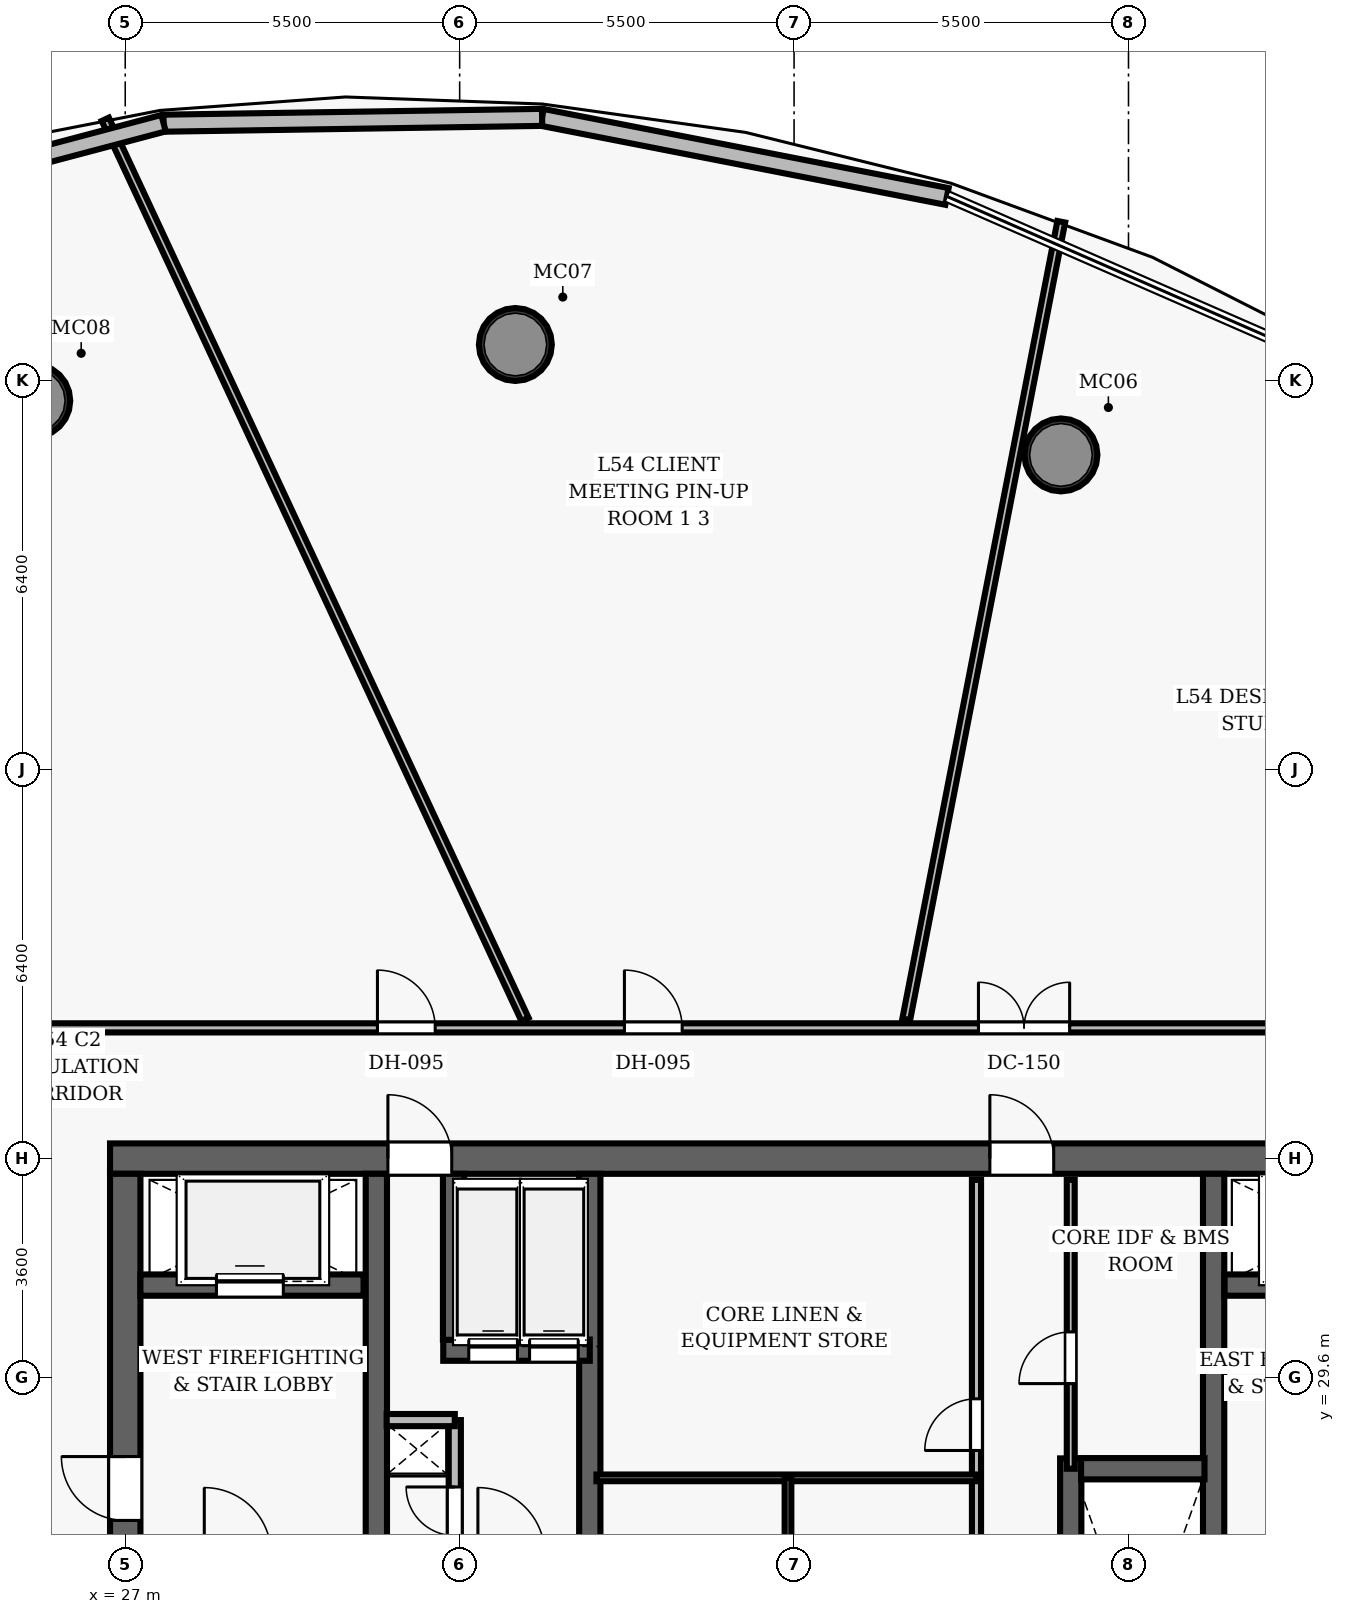
"""IFC4 building model, lengths in metres.
Left out: names, types, materials, properties, quantities, classifications, styles, units other than length and angle.
Written with IfcOpenShell. Run it as: python <this file> out.ifc"""

import sys

from ifc_helpers import new_model, si_unit, direction, frame, frame_2d, origin, origin_2d, place, context, subcontext, project, spatial, rectangle, hollow_circle, extrude, element, fill, save


model = new_model("IFC4")
c1 = context("Model", 3, precision=1e-05, world=origin(), true_north=direction((0.0, 1.0)))
c2 = subcontext(c1, "Body", "Model", "MODEL_VIEW")
j1 = project(units=[si_unit("LENGTHUNIT", "METRE"), si_unit("PLANEANGLEUNIT", "RADIAN")], contexts=[c1])
p1 = place(None, origin())
s1 = spatial("IfcSite", under=j1, at=p1, CompositionType="ELEMENT")
p2 = place(p1, origin())
s2 = spatial("IfcBuilding", under=s1, at=p2, CompositionType="ELEMENT")
p3 = place(p2, frame((0.0, 0.0, 213.55)))
s3 = spatial("IfcBuildingStorey", under=s2, at=p3, CompositionType="ELEMENT", Elevation=213.55)
p4 = place(p3, frame((26.75, 33.2, 0.0), z_axis=(0.0, 0.0, 1.0), x_axis=(1.0, 0.0, 0.0)))
e1 = element("IfcWall", 1, at=p4, inside=s3, PredefinedType="SHEAR", context=c2, shape_type="SweptSolid", body=[
    extrude(rectangle(XDim=22.5, YDim=0.5, at=frame_2d((11.25, 0.0))), origin(), (0.0, 0.0, 1.0), 3.85),
])
p5 = place(p4, frame((4.57, 0.0, 0.0)))
e2 = element("IfcOpeningElement", 2, at=p5, cuts=e1, PredefinedType="OPENING", context=c2, shape_type="SweptSolid", body=[
    extrude(rectangle(XDim=1.05, YDim=2.15, at=frame_2d((0.525, 1.075))), frame((0.0, 0.26, 0.0), z_axis=(0.0, -1.0, 0.0), x_axis=(1.0, 0.0, 0.0)), (0.0, 0.0, 1.0), 0.52),
])
p6 = place(p4, frame((14.47, 0.0, 0.0)))
e3 = element("IfcOpeningElement", 3, at=p6, cuts=e1, PredefinedType="OPENING", context=c2, shape_type="SweptSolid", body=[
    extrude(rectangle(XDim=1.05, YDim=2.15, at=frame_2d((0.525, 1.075))), frame((0.0, 0.26, 0.0), z_axis=(0.0, -1.0, 0.0), x_axis=(1.0, 0.0, 0.0)), (0.0, 0.0, 1.0), 0.52),
])
p7 = place(p3, frame((27.0, 19.05, 0.0), z_axis=(0.0, 0.0, 1.0), x_axis=(0.0, 1.0, 0.0)))
e4 = element("IfcWall", 4, at=p7, inside=s3, PredefinedType="SHEAR", context=c2, shape_type="SweptSolid", body=[
    extrude(rectangle(XDim=13.9, YDim=0.5, at=frame_2d((6.95, 0.0))), origin(), (0.0, 0.0, 1.0), 3.85),
])
p8 = place(p7, frame((8.2, 0.0, 0.0)))
e5 = element("IfcOpeningElement", 5, at=p8, cuts=e4, PredefinedType="OPENING", context=c2, shape_type="SweptSolid", body=[
    extrude(rectangle(XDim=1.05, YDim=2.15, at=frame_2d((0.525, 1.075))), frame((0.0, 0.26, 0.0), z_axis=(0.0, -1.0, 0.0), x_axis=(1.0, 0.0, 0.0)), (0.0, 0.0, 1.0), 0.52),
])
for number, where, z_axis, x_axis in (
    (6, (31.13, 19.05, 0.0), (0.0, 0.0, 1.0), (0.0, 1.0, 0.0)),
    (7, (44.9, 19.05, 0.0), (0.0, 0.0, 1.0), (0.0, 1.0, 0.0)),
):
    element("IfcWall", number, at=place(p3, frame(where, z_axis=z_axis, x_axis=x_axis)), inside=s3, PredefinedType="SHEAR", context=c2, shape_type="SweptSolid", body=[
        extrude(rectangle(XDim=13.9, YDim=0.35, at=frame_2d((6.95, 0.0))), origin(), (0.0, 0.0, 1.0), 3.85),
    ])
for number, where, z_axis, x_axis in (
    (8, (42.389, 44.772, 0.0), (0.0, 0.0, 1.0), (1.0, 0.0, 0.0)),
    (9, (33.416, 46.588, 0.0), (0.0, 0.0, 1.0), (1.0, 0.0, 0.0)),
    (10, (25.496, 45.664, 0.0), (0.0, 0.0, 1.0), (1.0, 0.0, 0.0)),
):
    element("IfcColumn", number, at=place(p3, frame(where, z_axis=z_axis, x_axis=x_axis)), inside=s3, PredefinedType="COLUMN", context=c2, shape_type="SweptSolid", body=[
        extrude(hollow_circle(Radius=0.6, WallThickness=0.05, at=origin_2d()), origin(), (0.0, 0.0, 1.0), 3.85),
    ])
p9 = place(p3, frame((27.25, 31.12, 0.0), z_axis=(0.0, 0.0, 1.0), x_axis=(1.0, 0.0, 0.0)))
e11 = element("IfcWall", 11, at=p9, inside=s3, PredefinedType="SHEAR", context=c2, shape_type="SweptSolid", body=[
    extrude(rectangle(XDim=3.67, YDim=0.35, at=frame_2d((1.835, 0.0))), origin(), (0.0, 0.0, 1.0), 3.035),
])
p10 = place(p9, frame((1.25, 0.0, 0.0)))
e12 = element("IfcOpeningElement", 12, at=p10, cuts=e11, PredefinedType="OPENING", context=c2, shape_type="SweptSolid", body=[
    extrude(rectangle(XDim=1.1, YDim=2.15, at=frame_2d((0.55, 1.075))), frame((0.0, 0.185, 0.0), z_axis=(0.0, -1.0, 0.0), x_axis=(1.0, 0.0, 0.0)), (0.0, 0.0, 1.0), 0.37),
])
p11 = place(p3, frame((45.08, 31.12, 0.0), z_axis=(0.0, 0.0, 1.0), x_axis=(1.0, 0.0, 0.0)))
e13 = element("IfcWall", 13, at=p11, inside=s3, PredefinedType="SHEAR", context=c2, shape_type="SweptSolid", body=[
    extrude(rectangle(XDim=3.67, YDim=0.35, at=frame_2d((1.835, 0.0))), origin(), (0.0, 0.0, 1.0), 3.035),
])
p12 = place(p11, frame((1.25, 0.0, 0.0)))
e14 = element("IfcOpeningElement", 14, at=p12, cuts=e13, PredefinedType="OPENING", context=c2, shape_type="SweptSolid", body=[
    extrude(rectangle(XDim=1.1, YDim=2.15, at=frame_2d((0.55, 1.075))), frame((0.0, 0.185, 0.0), z_axis=(0.0, -1.0, 0.0), x_axis=(1.0, 0.0, 0.0)), (0.0, 0.0, 1.0), 0.37),
])
p13 = place(p3, frame((34.64, 26.69, 0.0), z_axis=(0.0, 0.0, 1.0), x_axis=(0.0, 1.0, 0.0)))
e15 = element("IfcWall", 15, at=p13, inside=s3, PredefinedType="SHEAR", context=c2, shape_type="SweptSolid", body=[
    extrude(rectangle(XDim=6.26, YDim=0.35, at=frame_2d((3.13, 0.0))), origin(), (0.0, 0.0, 1.0), 3.85),
])
p14 = place(p3, frame((32.23, 30.05, 0.0), z_axis=(0.0, 0.0, 1.0), x_axis=(1.0, 0.0, 0.0)))
e16 = element("IfcWall", 16, at=p14, inside=s3, PredefinedType="SHEAR", context=c2, shape_type="SweptSolid", body=[
    extrude(rectangle(XDim=2.41, YDim=0.35, at=frame_2d((1.205, 0.0))), origin(), (0.0, 0.0, 1.0), 3.035),
])
p15 = place(p14, frame((0.42, 0.0, 0.0)))
e17 = element("IfcOpeningElement", 17, at=p15, cuts=e16, PredefinedType="OPENING", context=c2, shape_type="SweptSolid", body=[
    extrude(rectangle(XDim=0.8, YDim=2.15, at=frame_2d((0.4, 1.075))), frame((0.0, 0.185, 0.0), z_axis=(0.0, -1.0, 0.0), x_axis=(1.0, 0.0, 0.0)), (0.0, 0.0, 1.0), 0.37),
])
p16 = place(p14, frame((1.42, 0.0, 0.0)))
e18 = element("IfcOpeningElement", 18, at=p16, cuts=e16, PredefinedType="OPENING", context=c2, shape_type="SweptSolid", body=[
    extrude(rectangle(XDim=0.8, YDim=2.15, at=frame_2d((0.4, 1.075))), frame((0.0, 0.185, 0.0), z_axis=(0.0, -1.0, 0.0), x_axis=(1.0, 0.0, 0.0)), (0.0, 0.0, 1.0), 0.37),
])
p17 = place(p3, frame((32.4, 30.22, 0.0), z_axis=(0.0, 0.0, 1.0), x_axis=(0.0, 1.0, 0.0)))
e19 = element("IfcWall", 19, at=p17, inside=s3, PredefinedType="SHEAR", context=c2, shape_type="SweptSolid", body=[
    extrude(rectangle(XDim=2.73, YDim=0.35, at=frame_2d((1.365, 0.0))), origin(), (0.0, 0.0, 1.0), 3.035),
])
p18 = place(p3, frame((32.42, 26.86, 0.0), z_axis=(0.0, 0.0, 1.0), x_axis=(0.0, 1.0, 0.0)))
e20 = element("IfcWall", 20, at=p18, inside=s3, PredefinedType="PARTITIONING", context=c2, shape_type="SweptSolid", body=[
    extrude(rectangle(XDim=2.04, YDim=0.2, at=frame_2d((1.02, 0.0))), origin(), (0.0, 0.0, 1.0), 3.035),
])
p19 = place(p18, frame((0.14, 0.0, 0.0)))
e21 = element("IfcOpeningElement", 21, at=p19, cuts=e20, PredefinedType="OPENING", context=c2, shape_type="SweptSolid", body=[
    extrude(rectangle(XDim=0.8, YDim=2.05, at=frame_2d((0.4, 1.025))), frame((0.0, 0.11, 0.0), z_axis=(0.0, -1.0, 0.0), x_axis=(1.0, 0.0, 0.0)), (0.0, 0.0, 1.0), 0.22),
])
p20 = place(p3, frame((31.3, 28.9, 0.0), z_axis=(0.0, 0.0, 1.0), x_axis=(1.0, 0.0, 0.0)))
e22 = element("IfcWall", 22, at=p20, inside=s3, PredefinedType="PARTITIONING", context=c2, shape_type="SweptSolid", body=[
    extrude(rectangle(XDim=1.12, YDim=0.2, at=frame_2d((0.56, 0.0))), origin(), (0.0, 0.0, 1.0), 3.035),
])
p21 = place(p3, frame((42.55, 21.73, 0.0), z_axis=(0.0, 0.0, 1.0), x_axis=(0.0, 1.0, 0.0)))
e23 = element("IfcWall", 23, at=p21, inside=s3, PredefinedType="SHEAR", context=c2, shape_type="SweptSolid", body=[
    extrude(rectangle(XDim=6.54, YDim=0.35, at=frame_2d((3.27, 0.0))), origin(), (0.0, 0.0, 1.0), 3.035),
])
p22 = place(p3, frame((42.72, 28.1, 0.0), z_axis=(0.0, 0.0, 1.0), x_axis=(1.0, 0.0, 0.0)))
e24 = element("IfcWall", 24, at=p22, inside=s3, PredefinedType="SHEAR", context=c2, shape_type="SweptSolid", body=[
    extrude(rectangle(XDim=2.03, YDim=0.35, at=frame_2d((1.015, 0.0))), origin(), (0.0, 0.0, 1.0), 3.035),
])
p23 = place(p3, frame((41.0, 23.05, 0.0), z_axis=(0.0, 0.0, 1.0), x_axis=(0.0, 1.0, 0.0)))
e25 = element("IfcWall", 25, at=p23, inside=s3, PredefinedType="PARTITIONING", context=c2, shape_type="SweptSolid", body=[
    extrude(rectangle(XDim=9.8, YDim=0.15, at=frame_2d((4.9, 0.0))), origin(), (0.0, 0.0, 1.0), 3.035),
])
p24 = place(p23, frame((5.35, 0.0, 0.0)))
e26 = element("IfcOpeningElement", 26, at=p24, cuts=e25, PredefinedType="OPENING", context=c2, shape_type="SweptSolid", body=[
    extrude(rectangle(XDim=0.85, YDim=2.1, at=frame_2d((0.425, 1.05))), frame((0.0, 0.085, 0.0), z_axis=(0.0, -1.0, 0.0), x_axis=(1.0, 0.0, 0.0)), (0.0, 0.0, 1.0), 0.17),
])
p25 = place(p23, frame((0.45, 0.0, 0.0)))
e27 = element("IfcOpeningElement", 27, at=p25, cuts=e25, PredefinedType="OPENING", context=c2, shape_type="SweptSolid", body=[
    extrude(rectangle(XDim=0.85, YDim=2.1, at=frame_2d((0.425, 1.05))), frame((0.0, 0.085, 0.0), z_axis=(0.0, -1.0, 0.0), x_axis=(1.0, 0.0, 0.0)), (0.0, 0.0, 1.0), 0.17),
])
p26 = place(p3, frame((34.75, 27.95, 0.0), z_axis=(0.0, 0.0, 1.0), x_axis=(1.0, 0.0, 0.0)))
e28 = element("IfcWall", 28, at=p26, inside=s3, PredefinedType="PARTITIONING", context=c2, shape_type="SweptSolid", body=[
    extrude(rectangle(XDim=6.25, YDim=0.11, at=frame_2d((3.125, 0.0))), origin(), (0.0, 0.0, 1.0), 3.035),
])
p27 = place(p3, frame((37.9, 23.05, 0.0), z_axis=(0.0, 0.0, 1.0), x_axis=(0.0, 1.0, 0.0)))
e29 = element("IfcWall", 29, at=p27, inside=s3, PredefinedType="PARTITIONING", context=c2, shape_type="SweptSolid", body=[
    extrude(rectangle(XDim=4.9, YDim=0.11, at=frame_2d((2.45, 0.0))), origin(), (0.0, 0.0, 1.0), 3.035),
])
p28 = place(p27, frame((0.35, 0.0, 0.0)))
e30 = element("IfcOpeningElement", 30, at=p28, cuts=e29, PredefinedType="OPENING", context=c2, shape_type="SweptSolid", body=[
    extrude(rectangle(XDim=0.85, YDim=2.1, at=frame_2d((0.425, 1.05))), frame((0.0, 0.065, 0.0), z_axis=(0.0, -1.0, 0.0), x_axis=(1.0, 0.0, 0.0)), (0.0, 0.0, 1.0), 0.13),
])
p29 = place(p3, frame((42.55, 28.1, 0.0), z_axis=(0.0, 0.0, 1.0), x_axis=(0.0, 1.0, 0.0)))
e31 = element("IfcWall", 31, at=p29, inside=s3, PredefinedType="PARTITIONING", context=c2, shape_type="SweptSolid", body=[
    extrude(rectangle(XDim=4.75, YDim=0.13, at=frame_2d((2.375, 0.0))), origin(), (0.0, 0.0, 1.0), 3.035),
])
p30 = place(p29, frame((1.4, 0.0, 0.0)))
e32 = element("IfcOpeningElement", 32, at=p30, cuts=e31, PredefinedType="OPENING", context=c2, shape_type="SweptSolid", body=[
    extrude(rectangle(XDim=0.85, YDim=2.1, at=frame_2d((0.425, 1.05))), frame((0.0, 0.075, 0.0), z_axis=(0.0, -1.0, 0.0), x_axis=(1.0, 0.0, 0.0)), (0.0, 0.0, 1.0), 0.15),
])
p31 = place(p3, frame((24.85, 35.35, 0.0), z_axis=(0.0, 0.0, 1.0), x_axis=(1.0, 0.0, 0.0)))
e33 = element("IfcWall", 33, at=p31, inside=s3, PredefinedType="PARTITIONING", context=c2, shape_type="SweptSolid", body=[
    extrude(rectangle(XDim=26.0, YDim=0.15, at=frame_2d((13.0, 0.0))), origin(), (0.0, 0.0, 1.0), 3.035),
])
p32 = place(p31, frame((16.182, 0.0, 0.0)))
e34 = element("IfcOpeningElement", 34, at=p32, cuts=e33, PredefinedType="OPENING", context=c2, shape_type="SweptSolid", body=[
    extrude(rectangle(XDim=1.5, YDim=2.2, at=frame_2d((0.75, 1.1))), frame((0.0, 0.085, 0.0), z_axis=(0.0, -1.0, 0.0), x_axis=(1.0, 0.0, 0.0)), (0.0, 0.0, 1.0), 0.17),
])
p33 = place(p31, frame((10.36, 0.0, 0.0)))
e35 = element("IfcOpeningElement", 35, at=p33, cuts=e33, PredefinedType="OPENING", context=c2, shape_type="SweptSolid", body=[
    extrude(rectangle(XDim=0.95, YDim=2.15, at=frame_2d((0.475, 1.075))), frame((0.0, 0.085, 0.0), z_axis=(0.0, -1.0, 0.0), x_axis=(1.0, 0.0, 0.0)), (0.0, 0.0, 1.0), 0.17),
])
p34 = place(p31, frame((6.298, 0.0, 0.0)))
e36 = element("IfcOpeningElement", 36, at=p34, cuts=e33, PredefinedType="OPENING", context=c2, shape_type="SweptSolid", body=[
    extrude(rectangle(XDim=0.95, YDim=2.15, at=frame_2d((0.475, 1.075))), frame((0.0, 0.085, 0.0), z_axis=(0.0, -1.0, 0.0), x_axis=(1.0, 0.0, 0.0)), (0.0, 0.0, 1.0), 0.17),
])
p35 = place(p3, frame((39.845, 35.49, 0.0), z_axis=(0.0, 0.0, 1.0), x_axis=(0.19080412757, 0.981628129641, 0.0)))
e37 = element("IfcWall", 37, at=p35, inside=s3, PredefinedType="PARTITIONING", context=c2, shape_type="SweptSolid", body=[
    extrude(rectangle(XDim=13.362, YDim=0.13, at=frame_2d((6.681, 0.0))), origin(), (0.0, 0.0, 1.0), 3.035),
])
p36 = place(p3, frame((33.575, 35.49, 0.0), z_axis=(0.0, 0.0, 1.0), x_axis=(-0.422608843955, 0.906312178563, 0.0)))
e38 = element("IfcWall", 38, at=p36, inside=s3, PredefinedType="PARTITIONING", context=c2, shape_type="SweptSolid", body=[
    extrude(rectangle(XDim=16.332, YDim=0.13, at=frame_2d((8.166, 0.0))), origin(), (0.0, 0.0, 1.0), 3.035),
])
p37 = place(p3, frame((33.856, 50.323, 0.0), z_axis=(0.0, 0.0, 1.0), x_axis=(0.981469964999, -0.191616042662, 0.0)))
e39 = element("IfcWall", 39, at=p37, inside=s3, PredefinedType="SOLIDWALL", context=c2, shape_type="SweptSolid", body=[
    extrude(rectangle(XDim=6.785, YDim=0.28, at=frame_2d((3.392, 0.0))), origin(), (0.0, 0.0, 1.0), 3.62),
])
p38 = place(p3, frame((27.63, 50.228, 0.0), z_axis=(0.0, 0.0, 1.0), x_axis=(0.999882465169, 0.015331531133, 0.0)))
e40 = element("IfcWall", 40, at=p38, inside=s3, PredefinedType="SOLIDWALL", context=c2, shape_type="SweptSolid", body=[
    extrude(rectangle(XDim=6.226, YDim=0.28, at=frame_2d((3.113, 0.0))), origin(), (0.0, 0.0, 1.0), 3.62),
])
p39 = place(p3, frame((22.348, 48.828, 0.0), z_axis=(0.0, 0.0, 1.0), x_axis=(0.966618709205, 0.256219185491, 0.0)))
e41 = element("IfcWall", 41, at=p39, inside=s3, PredefinedType="SOLIDWALL", context=c2, shape_type="SweptSolid", body=[
    extrude(rectangle(XDim=5.465, YDim=0.28, at=frame_2d((2.732, 0.0))), origin(), (0.0, 0.0, 1.0), 3.62),
])
p40 = place(p8, origin())
e42 = element("IfcDoor", 42, at=p40, inside=s3, OperationType="SINGLE_SWING_RIGHT", PredefinedType="DOOR", context=c2, shape_type="SweptSolid", body=[
    extrude(rectangle(XDim=1.05, YDim=2.15, at=frame_2d((0.525, 1.075))), frame((0.0, 0.025, 0.0), z_axis=(0.0, -1.0, 0.0), x_axis=(1.0, 0.0, 0.0)), (0.0, 0.0, 1.0), 0.05),
])
fill(e5, e42)
p41 = place(p19, origin())
e43 = element("IfcDoor", 43, at=p41, inside=s3, OperationType="SINGLE_SWING_RIGHT", PredefinedType="DOOR", context=c2, shape_type="SweptSolid", body=[
    extrude(rectangle(XDim=0.8, YDim=2.05, at=frame_2d((0.4, 1.025))), frame((0.0, 0.025, 0.0), z_axis=(0.0, -1.0, 0.0), x_axis=(1.0, 0.0, 0.0)), (0.0, 0.0, 1.0), 0.05),
])
fill(e21, e43)
p42 = place(p5, origin())
e44 = element("IfcDoor", 44, at=p42, inside=s3, OperationType="SINGLE_SWING_LEFT", PredefinedType="DOOR", context=c2, shape_type="SweptSolid", body=[
    extrude(rectangle(XDim=1.05, YDim=2.15, at=frame_2d((0.525, 1.075))), frame((0.0, 0.025, 0.0), z_axis=(0.0, -1.0, 0.0), x_axis=(1.0, 0.0, 0.0)), (0.0, 0.0, 1.0), 0.05),
])
fill(e2, e44)
p43 = place(p6, origin())
e45 = element("IfcDoor", 45, at=p43, inside=s3, OperationType="SINGLE_SWING_LEFT", PredefinedType="DOOR", context=c2, shape_type="SweptSolid", body=[
    extrude(rectangle(XDim=1.05, YDim=2.15, at=frame_2d((0.525, 1.075))), frame((0.0, 0.025, 0.0), z_axis=(0.0, -1.0, 0.0), x_axis=(1.0, 0.0, 0.0)), (0.0, 0.0, 1.0), 0.05),
])
fill(e3, e45)
p44 = place(p24, origin())
e46 = element("IfcDoor", 46, at=p44, inside=s3, OperationType="SINGLE_SWING_LEFT", PredefinedType="DOOR", context=c2, shape_type="SweptSolid", body=[
    extrude(rectangle(XDim=0.85, YDim=2.1, at=frame_2d((0.425, 1.05))), frame((0.0, 0.025, 0.0), z_axis=(0.0, -1.0, 0.0), x_axis=(1.0, 0.0, 0.0)), (0.0, 0.0, 1.0), 0.05),
])
fill(e26, e46)
p45 = place(p30, origin())
e47 = element("IfcDoor", 47, at=p45, inside=s3, OperationType="SINGLE_SWING_LEFT", PredefinedType="DOOR", context=c2, shape_type="SweptSolid", body=[
    extrude(rectangle(XDim=0.85, YDim=2.1, at=frame_2d((0.425, 1.05))), frame((0.0, 0.025, 0.0), z_axis=(0.0, -1.0, 0.0), x_axis=(1.0, 0.0, 0.0)), (0.0, 0.0, 1.0), 0.05),
])
fill(e32, e47)
p46 = place(p32, origin())
e48 = element("IfcDoor", 48, at=p46, inside=s3, OperationType="DOUBLE_DOOR_SINGLE_SWING", PredefinedType="DOOR", context=c2, shape_type="SweptSolid", body=[
    extrude(rectangle(XDim=1.5, YDim=2.2, at=frame_2d((0.75, 1.1))), frame((0.0, 0.025, 0.0), z_axis=(0.0, -1.0, 0.0), x_axis=(1.0, 0.0, 0.0)), (0.0, 0.0, 1.0), 0.05),
])
fill(e34, e48)
p47 = place(p33, origin())
e49 = element("IfcDoor", 49, at=p47, inside=s3, OperationType="SINGLE_SWING_LEFT", PredefinedType="DOOR", context=c2, shape_type="SweptSolid", body=[
    extrude(rectangle(XDim=0.95, YDim=2.15, at=frame_2d((0.475, 1.075))), frame((0.0, 0.025, 0.0), z_axis=(0.0, -1.0, 0.0), x_axis=(1.0, 0.0, 0.0)), (0.0, 0.0, 1.0), 0.05),
])
fill(e35, e49)
p48 = place(p34, origin())
e50 = element("IfcDoor", 50, at=p48, inside=s3, OperationType="SINGLE_SWING_LEFT", PredefinedType="DOOR", context=c2, shape_type="SweptSolid", body=[
    extrude(rectangle(XDim=0.95, YDim=2.15, at=frame_2d((0.475, 1.075))), frame((0.0, 0.025, 0.0), z_axis=(0.0, -1.0, 0.0), x_axis=(1.0, 0.0, 0.0)), (0.0, 0.0, 1.0), 0.05),
])
fill(e36, e50)
p49 = place(p10, origin())
e51 = element("IfcDoor", 51, at=p49, inside=s3, OperationType="SLIDING_TO_LEFT", PredefinedType="DOOR", context=c2, shape_type="SweptSolid", body=[
    extrude(rectangle(XDim=1.1, YDim=2.15, at=frame_2d((0.55, 1.075))), frame((0.0, 0.025, 0.0), z_axis=(0.0, -1.0, 0.0), x_axis=(1.0, 0.0, 0.0)), (0.0, 0.0, 1.0), 0.05),
])
fill(e12, e51)
p50 = place(p15, origin())
e52 = element("IfcDoor", 52, at=p50, inside=s3, OperationType="SLIDING_TO_LEFT", PredefinedType="DOOR", context=c2, shape_type="SweptSolid", body=[
    extrude(rectangle(XDim=0.8, YDim=2.15, at=frame_2d((0.4, 1.075))), frame((0.0, 0.025, 0.0), z_axis=(0.0, -1.0, 0.0), x_axis=(1.0, 0.0, 0.0)), (0.0, 0.0, 1.0), 0.05),
])
fill(e17, e52)
p51 = place(p16, origin())
e53 = element("IfcDoor", 53, at=p51, inside=s3, OperationType="SLIDING_TO_LEFT", PredefinedType="DOOR", context=c2, shape_type="SweptSolid", body=[
    extrude(rectangle(XDim=0.8, YDim=2.15, at=frame_2d((0.4, 1.075))), frame((0.0, 0.025, 0.0), z_axis=(0.0, -1.0, 0.0), x_axis=(1.0, 0.0, 0.0)), (0.0, 0.0, 1.0), 0.05),
])
fill(e18, e53)
save(model, sys.argv[1])
